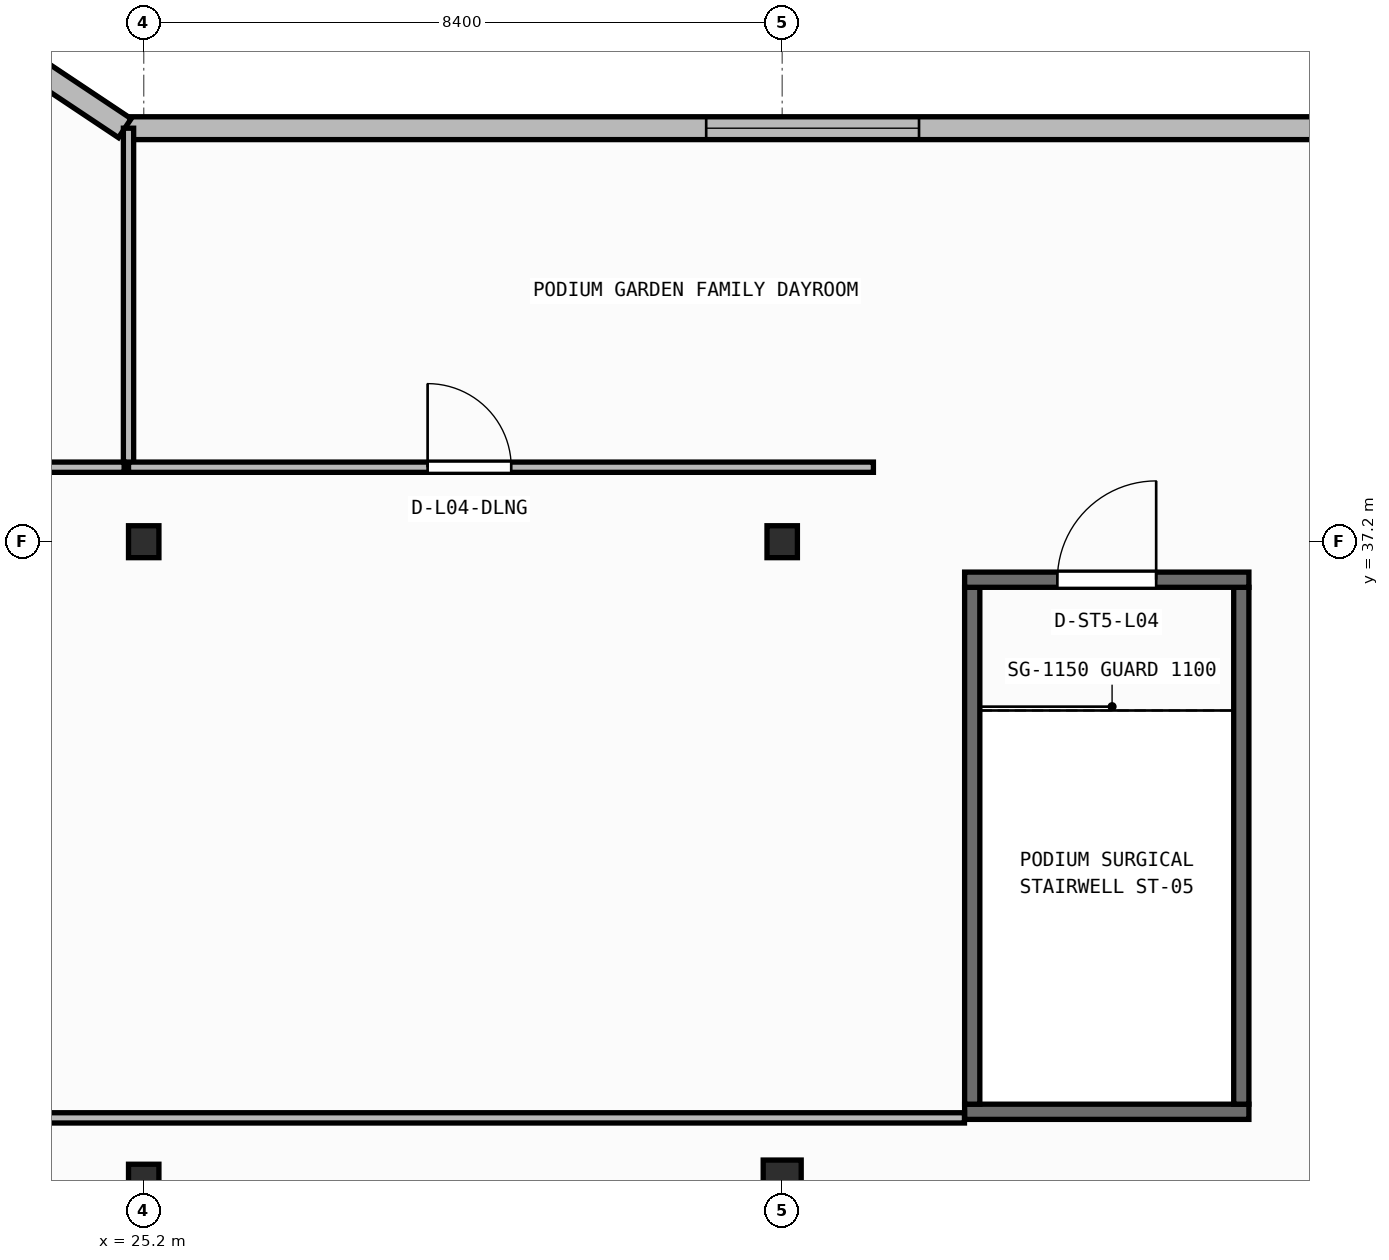
"""IFC4 building model, lengths in metres.
Left out: names, types, materials, properties, quantities, classifications, styles, units other than length and angle.
Written with IfcOpenShell. Run it as: python <this file> out.ifc"""

import sys

from ifc_helpers import new_model, si_unit, direction, frame, frame_2d, origin, origin_2d, place, context, subcontext, project, spatial, rectangle, i_section, extrude, element, fill, save


model = new_model("IFC4")
c1 = context("Model", 3, precision=1e-05, world=origin(), true_north=direction((0.0, 1.0)))
c2 = subcontext(c1, "Body", "Model", "MODEL_VIEW")
j1 = project(units=[si_unit("LENGTHUNIT", "METRE"), si_unit("PLANEANGLEUNIT", "RADIAN")], contexts=[c1])
p1 = place(None, origin())
s1 = spatial("IfcSite", under=j1, at=p1, CompositionType="ELEMENT")
p2 = place(p1, origin())
s2 = spatial("IfcBuilding", under=s1, at=p2, CompositionType="ELEMENT")
p3 = place(p2, frame((0.0, 0.0, 18.0)))
s3 = spatial("IfcBuildingStorey", under=s2, at=p3, CompositionType="ELEMENT", Elevation=18.0)
p4 = place(p3, frame((25.2, 28.8, 0.0), z_axis=(0.0, 0.0, 1.0), x_axis=(1.0, 0.0, 0.0)))
e1 = element("IfcColumn", 1, at=p4, inside=s3, PredefinedType="COLUMN", context=c2, shape_type="SweptSolid", body=[
    extrude(i_section(OverallWidth=0.4, OverallDepth=0.42, WebThickness=0.025, FlangeThickness=0.04, at=origin_2d()), origin(), (0.0, 0.0, 1.0), 4.5),
])
p5 = place(p3, frame((33.6, 28.8, 0.0), z_axis=(0.0, 0.0, 1.0), x_axis=(1.0, 0.0, 0.0)))
e2 = element("IfcColumn", 2, at=p5, inside=s3, PredefinedType="COLUMN", context=c2, shape_type="SweptSolid", body=[
    extrude(i_section(OverallWidth=0.5, OverallDepth=0.53, WebThickness=0.028, FlangeThickness=0.045, at=origin_2d()), origin(), (0.0, 0.0, 1.0), 4.5),
])
for number, where, z_axis, x_axis in (
    (3, (25.2, 37.2, 0.0), (0.0, 0.0, 1.0), (1.0, 0.0, 0.0)),
    (4, (33.6, 37.2, 0.0), (0.0, 0.0, 1.0), (1.0, 0.0, 0.0)),
):
    element("IfcColumn", number, at=place(p3, frame(where, z_axis=z_axis, x_axis=x_axis)), inside=s3, PredefinedType="COLUMN", context=c2, shape_type="SweptSolid", body=[
        extrude(i_section(OverallWidth=0.4, OverallDepth=0.42, WebThickness=0.025, FlangeThickness=0.04, at=origin_2d()), origin(), (0.0, 0.0, 1.0), 4.5),
    ])
p6 = place(p3, frame((43.048, 42.64, 0.0), z_axis=(0.0, 0.0, 1.0), x_axis=(-1.0, 0.0, 0.0)))
e5 = element("IfcWall", 5, at=p6, inside=s3, PredefinedType="STANDARD", context=c2, shape_type="SweptSolid", body=[
    extrude(rectangle(XDim=18.097, YDim=0.3, at=frame_2d((9.048, 0.0))), origin(), (0.0, 0.0, 1.0), 4.08),
])
p7 = place(p6, frame((7.648, 0.0, 0.85)))
e6 = element("IfcOpeningElement", 6, at=p7, cuts=e5, PredefinedType="OPENING", context=c2, shape_type="SweptSolid", body=[
    extrude(rectangle(XDim=2.8, YDim=2.1, at=frame_2d((1.4, 1.05))), frame((0.0, 0.16, 0.0), z_axis=(0.0, -1.0, 0.0), x_axis=(1.0, 0.0, 0.0)), (0.0, 0.0, 1.0), 0.32),
])
p8 = place(p3, frame((24.952, 42.64, 0.0), z_axis=(0.0, 0.0, 1.0), x_axis=(-0.832050294338, 0.554700196225, 0.0)))
e7 = element("IfcWall", 7, at=p8, inside=s3, PredefinedType="STANDARD", context=c2, shape_type="SweptSolid", body=[
    extrude(rectangle(XDim=7.211, YDim=0.3, at=frame_2d((3.605, 0.0))), origin(), (0.0, 0.0, 1.0), 4.08),
])
p9 = place(p8, frame((2.206, 0.0, 0.85)))
e8 = element("IfcOpeningElement", 8, at=p9, cuts=e7, PredefinedType="OPENING", context=c2, shape_type="SweptSolid", body=[
    extrude(rectangle(XDim=2.8, YDim=2.1, at=frame_2d((1.4, 1.05))), frame((0.0, 0.16, 0.0), z_axis=(0.0, -1.0, 0.0), x_axis=(1.0, 0.0, 0.0)), (0.0, 0.0, 1.0), 0.32),
])
p10 = place(p3, frame((36.0, 29.7, 0.0), z_axis=(0.0, 0.0, 1.0), x_axis=(1.0, 0.0, 0.0)))
e9 = element("IfcWall", 9, at=p10, inside=s3, PredefinedType="SHEAR", context=c2, shape_type="SweptSolid", body=[
    extrude(rectangle(XDim=3.74, YDim=0.2, at=frame_2d((1.87, 0.0))), origin(), (0.0, 0.0, 1.0), 4.08),
])
for number, where, z_axis, x_axis in (
    (10, (36.1, 29.8, 0.0), (0.0, 0.0, 1.0), (0.0, 1.0, 0.0)),
    (11, (39.64, 29.8, 0.0), (0.0, 0.0, 1.0), (0.0, 1.0, 0.0)),
):
    element("IfcWall", number, at=place(p3, frame(where, z_axis=z_axis, x_axis=x_axis)), inside=s3, PredefinedType="SHEAR", context=c2, shape_type="SweptSolid", body=[
        extrude(rectangle(XDim=6.8, YDim=0.2, at=frame_2d((3.4, 0.0))), origin(), (0.0, 0.0, 1.0), 4.08),
    ])
p11 = place(p3, frame((36.0, 36.7, 0.0), z_axis=(0.0, 0.0, 1.0), x_axis=(1.0, 0.0, 0.0)))
e12 = element("IfcWall", 12, at=p11, inside=s3, PredefinedType="SHEAR", context=c2, shape_type="SweptSolid", body=[
    extrude(rectangle(XDim=3.74, YDim=0.2, at=frame_2d((1.87, 0.0))), origin(), (0.0, 0.0, 1.0), 4.08),
])
p12 = place(p11, frame((1.22, 0.0, 0.0)))
e13 = element("IfcOpeningElement", 13, at=p12, cuts=e12, PredefinedType="OPENING", context=c2, shape_type="SweptSolid", body=[
    extrude(rectangle(XDim=1.3, YDim=2.15, at=frame_2d((0.65, 1.075))), frame((0.0, 0.11, 0.0), z_axis=(0.0, -1.0, 0.0), x_axis=(1.0, 0.0, 0.0)), (0.0, 0.0, 1.0), 0.22),
])
p13 = place(p3, frame((35.998, 29.62, 0.0), z_axis=(0.0, 0.0, 1.0), x_axis=(-1.0, 0.0, 0.0)))
e14 = element("IfcWall", 14, at=p13, inside=s3, PredefinedType="PARTITIONING", context=c2, shape_type="SweptSolid", body=[
    extrude(rectangle(XDim=13.94, YDim=0.135, at=frame_2d((6.97, 0.0))), origin(), (0.0, 0.0, 1.0), 4.08),
])
p14 = place(p3, frame((25.0, 42.64, 0.0), z_axis=(0.0, 0.0, 1.0), x_axis=(0.0, -1.0, 0.0)))
e15 = element("IfcWall", 15, at=p14, inside=s3, PredefinedType="PARTITIONING", context=c2, shape_type="SweptSolid", body=[
    extrude(rectangle(XDim=4.46, YDim=0.135, at=frame_2d((2.23, 0.0))), origin(), (0.0, 0.0, 1.0), 4.08),
])
p15 = place(p3, frame((25.0, 38.18, 0.0), z_axis=(0.0, 0.0, 1.0), x_axis=(1.0, 0.0, 0.0)))
e16 = element("IfcWall", 16, at=p15, inside=s3, PredefinedType="PARTITIONING", context=c2, shape_type="SweptSolid", body=[
    extrude(rectangle(XDim=9.8, YDim=0.135, at=frame_2d((4.9, 0.0))), origin(), (0.0, 0.0, 1.0), 4.08),
])
p16 = place(p15, frame((3.935, 0.0, 0.0)))
e17 = element("IfcOpeningElement", 17, at=p16, cuts=e16, PredefinedType="OPENING", context=c2, shape_type="SweptSolid", body=[
    extrude(rectangle(XDim=1.1, YDim=2.1, at=frame_2d((0.55, 1.05))), frame((0.0, 0.077, 0.0), z_axis=(0.0, -1.0, 0.0), x_axis=(1.0, 0.0, 0.0)), (0.0, 0.0, 1.0), 0.155),
])
p17 = place(p3, frame((14.2, 38.18, 0.0), z_axis=(0.0, 0.0, 1.0), x_axis=(1.0, 0.0, 0.0)))
e18 = element("IfcWall", 18, at=p17, inside=s3, PredefinedType="PARTITIONING", context=c2, shape_type="SweptSolid", body=[
    extrude(rectangle(XDim=10.742, YDim=0.135, at=frame_2d((5.371, 0.0))), origin(), (0.0, 0.0, 1.0), 4.08),
])
p18 = place(p17, frame((6.208, 0.0, 0.0)))
e19 = element("IfcOpeningElement", 19, at=p18, cuts=e18, PredefinedType="OPENING", context=c2, shape_type="SweptSolid", body=[
    extrude(rectangle(XDim=1.1, YDim=2.1, at=frame_2d((0.55, 1.05))), frame((0.0, 0.077, 0.0), z_axis=(0.0, -1.0, 0.0), x_axis=(1.0, 0.0, 0.0)), (0.0, 0.0, 1.0), 0.155),
])
p19 = place(p7, origin())
e20 = element("IfcWindow", 20, at=p19, inside=s3, PartitioningType="SINGLE_PANEL", PredefinedType="WINDOW", context=c2, shape_type="SweptSolid", body=[
    extrude(rectangle(XDim=2.8, YDim=2.1, at=frame_2d((1.4, 1.05))), frame((0.0, 0.03, 0.0), z_axis=(0.0, -1.0, 0.0), x_axis=(1.0, 0.0, 0.0)), (0.0, 0.0, 1.0), 0.06),
])
fill(e6, e20)
p20 = place(p12, origin())
e21 = element("IfcDoor", 21, at=p20, inside=s3, OperationType="SINGLE_SWING_RIGHT", PredefinedType="DOOR", context=c2, shape_type="SweptSolid", body=[
    extrude(rectangle(XDim=1.3, YDim=2.15, at=frame_2d((0.65, 1.075))), frame((0.0, 0.025, 0.0), z_axis=(0.0, -1.0, 0.0), x_axis=(1.0, 0.0, 0.0)), (0.0, 0.0, 1.0), 0.05),
])
fill(e13, e21)
p21 = place(p16, origin())
e22 = element("IfcDoor", 22, at=p21, inside=s3, OperationType="SINGLE_SWING_LEFT", PredefinedType="DOOR", context=c2, shape_type="SweptSolid", body=[
    extrude(rectangle(XDim=1.1, YDim=2.1, at=frame_2d((0.55, 1.05))), frame((0.0, 0.025, 0.0), z_axis=(0.0, -1.0, 0.0), x_axis=(1.0, 0.0, 0.0)), (0.0, 0.0, 1.0), 0.05),
])
fill(e17, e22)
save(model, sys.argv[1])
